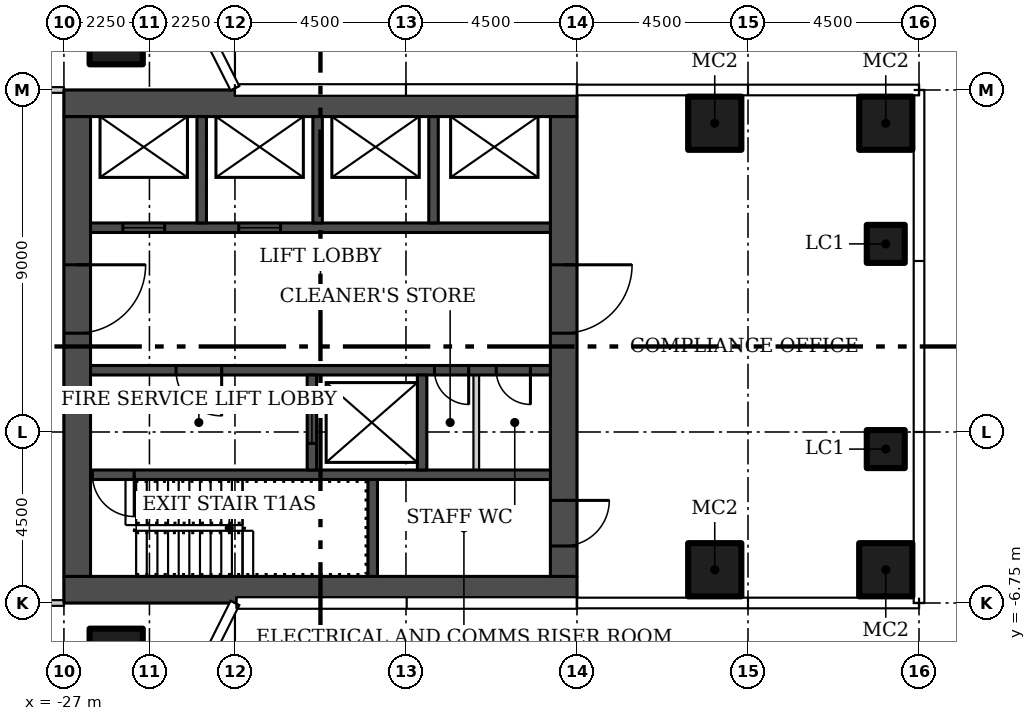
"""IFC4 building model, lengths in metres.
Left out: names, types, materials, properties, quantities, classifications, styles, units other than length and angle.
Written with IfcOpenShell. Run it as: python <this file> out.ifc"""

import sys

from ifc_helpers import new_model, si_unit, direction, frame, frame_2d, origin, origin_2d, place, context, subcontext, project, spatial, rectangle, hollow_rectangle, extrude, element, fill, save


model = new_model("IFC4")
c1 = context("Model", 3, precision=1e-05, world=origin(), true_north=direction((0.0, 1.0)))
c2 = subcontext(c1, "Body", "Model", "MODEL_VIEW")
j1 = project(units=[si_unit("LENGTHUNIT", "METRE"), si_unit("PLANEANGLEUNIT", "RADIAN")], contexts=[c1])
p1 = place(None, origin())
s1 = spatial("IfcSite", under=j1, at=p1, CompositionType="ELEMENT")
p2 = place(p1, origin())
s2 = spatial("IfcBuilding", under=s1, at=p2, CompositionType="ELEMENT")
p3 = place(p2, frame((0.0, 0.0, 65.4)))
s3 = spatial("IfcBuildingStorey", under=s2, at=p3, CompositionType="ELEMENT", Elevation=65.4)
for number, where in (
    (1, (-25.625, 8.125, 0.0)),
    (2, (-25.625, -8.125, 0.0)),
    (3, (-9.875, -5.875, 0.0)),
    (4, (-5.375, -5.875, 0.0)),
    (5, (-9.875, 5.875, 0.0)),
    (6, (-5.375, 5.875, 0.0)),
):
    element("IfcColumn", number, at=place(p3, frame(where)), inside=s3, PredefinedType="COLUMN", context=c2, shape_type="SweptSolid", body=[
        extrude(hollow_rectangle(XDim=1.4, YDim=1.4, WallThickness=0.05, at=origin_2d()), origin(), (0.0, 0.0, 1.0), 3.55),
    ])
for number, where in (
    (7, (-5.375, -2.7, 0.0)),
    (8, (-5.375, 2.7, 0.0)),
):
    element("IfcColumn", number, at=place(p3, frame(where)), inside=s3, PredefinedType="COLUMN", context=c2, shape_type="SweptSolid", body=[
        extrude(hollow_rectangle(XDim=1.0, YDim=1.0, WallThickness=0.04, at=origin_2d()), origin(), (0.0, 0.0, 1.0), 3.55),
    ])
p4 = place(p3, frame((-40.5, 6.75, 0.0)))
e9 = element("IfcWall", 9, at=p4, inside=s3, PredefinedType="PARTITIONING", context=c2, shape_type="SweptSolid", body=[
    extrude(rectangle(XDim=13.5, YDim=0.15, at=frame_2d((6.75, 0.0))), origin(), (0.0, 0.0, 1.0), 3.55),
])
p5 = place(p4, frame((6.0, 0.0, 0.0)))
e10 = element("IfcOpeningElement", 10, at=p5, cuts=e9, PredefinedType="OPENING", context=c2, shape_type="SweptSolid", body=[
    extrude(rectangle(XDim=1.5, YDim=2.1, at=frame_2d((0.75, 1.05))), frame((0.0, 0.085, 0.0), z_axis=(0.0, -1.0, 0.0), x_axis=(1.0, 0.0, 0.0)), (0.0, 0.0, 1.0), 0.17),
])
p6 = place(p3, frame((-27.0, -6.75, 0.0), z_axis=(0.0, 0.0, 1.0), x_axis=(-1.0, 0.0, 0.0)))
e11 = element("IfcWall", 11, at=p6, inside=s3, PredefinedType="PARTITIONING", context=c2, shape_type="SweptSolid", body=[
    extrude(rectangle(XDim=13.5, YDim=0.15, at=frame_2d((6.75, 0.0))), origin(), (0.0, 0.0, 1.0), 3.55),
])
p7 = place(p6, frame((3.75, 0.0, 0.0)))
e12 = element("IfcOpeningElement", 12, at=p7, cuts=e11, PredefinedType="OPENING", context=c2, shape_type="SweptSolid", body=[
    extrude(rectangle(XDim=1.5, YDim=2.1, at=frame_2d((0.75, 1.05))), frame((0.0, 0.085, 0.0), z_axis=(0.0, -1.0, 0.0), x_axis=(1.0, 0.0, 0.0)), (0.0, 0.0, 1.0), 0.17),
])
p8 = place(p6, frame((10.5, 0.0, 0.0)))
e13 = element("IfcOpeningElement", 13, at=p8, cuts=e11, PredefinedType="OPENING", context=c2, shape_type="SweptSolid", body=[
    extrude(rectangle(XDim=1.5, YDim=2.1, at=frame_2d((0.75, 1.05))), frame((0.0, 0.085, 0.0), z_axis=(0.0, -1.0, 0.0), x_axis=(1.0, 0.0, 0.0)), (0.0, 0.0, 1.0), 0.17),
])
for number, where in (
    (14, (-27.0, -6.4, 0.0)),
    (15, (-27.0, 6.4, 0.0)),
):
    element("IfcWall", number, at=place(p3, frame(where)), inside=s3, PredefinedType="SHEAR", context=c2, shape_type="SweptSolid", body=[
        extrude(rectangle(XDim=13.5, YDim=0.7, at=frame_2d((6.75, 0.0))), origin(), (0.0, 0.0, 1.0), 3.55),
    ])
p9 = place(p3, frame((-26.65, 6.05, 0.0), z_axis=(0.0, 0.0, 1.0), x_axis=(0.0, -1.0, 0.0)))
e16 = element("IfcWall", 16, at=p9, inside=s3, PredefinedType="SHEAR", context=c2, shape_type="SweptSolid", body=[
    extrude(rectangle(XDim=12.1, YDim=0.7, at=frame_2d((6.05, 0.0))), origin(), (0.0, 0.0, 1.0), 3.55),
])
p10 = place(p9, frame((3.9, 0.0, 0.0)))
e17 = element("IfcOpeningElement", 17, at=p10, cuts=e16, PredefinedType="OPENING", context=c2, shape_type="SweptSolid", body=[
    extrude(rectangle(XDim=1.8, YDim=2.4, at=frame_2d((0.9, 1.2))), frame((0.0, 0.36, 0.0), z_axis=(0.0, -1.0, 0.0), x_axis=(1.0, 0.0, 0.0)), (0.0, 0.0, 1.0), 0.72),
])
p11 = place(p3, frame((-13.85, 6.05, 0.0), z_axis=(0.0, 0.0, 1.0), x_axis=(0.0, -1.0, 0.0)))
e18 = element("IfcWall", 18, at=p11, inside=s3, PredefinedType="SHEAR", context=c2, shape_type="SweptSolid", body=[
    extrude(rectangle(XDim=12.1, YDim=0.7, at=frame_2d((6.05, 0.0))), origin(), (0.0, 0.0, 1.0), 3.55),
])
p12 = place(p11, frame((10.1, 0.0, 0.0)))
e19 = element("IfcOpeningElement", 19, at=p12, cuts=e18, PredefinedType="OPENING", context=c2, shape_type="SweptSolid", body=[
    extrude(rectangle(XDim=1.2, YDim=2.1, at=frame_2d((0.6, 1.05))), frame((0.0, 0.36, 0.0), z_axis=(0.0, -1.0, 0.0), x_axis=(1.0, 0.0, 0.0)), (0.0, 0.0, 1.0), 0.72),
])
p13 = place(p11, frame((3.9, 0.0, 0.0)))
e20 = element("IfcOpeningElement", 20, at=p13, cuts=e18, PredefinedType="OPENING", context=c2, shape_type="SweptSolid", body=[
    extrude(rectangle(XDim=1.8, YDim=2.4, at=frame_2d((0.9, 1.2))), frame((0.0, 0.36, 0.0), z_axis=(0.0, -1.0, 0.0), x_axis=(1.0, 0.0, 0.0)), (0.0, 0.0, 1.0), 0.72),
])
p14 = place(p3, frame((-14.2, -3.375, 0.0), z_axis=(0.0, 0.0, 1.0), x_axis=(-1.0, 0.0, 0.0)))
e21 = element("IfcWall", 21, at=p14, inside=s3, PredefinedType="SHEAR", context=c2, shape_type="SweptSolid", body=[
    extrude(rectangle(XDim=12.1, YDim=0.25, at=frame_2d((6.05, 0.0))), origin(), (0.0, 0.0, 1.0), 3.55),
])
p15 = place(p14, frame((10.95, 0.0, 0.0)))
e22 = element("IfcOpeningElement", 22, at=p15, cuts=e21, PredefinedType="OPENING", context=c2, shape_type="SweptSolid", body=[
    extrude(rectangle(XDim=1.1, YDim=2.1, at=frame_2d((0.55, 1.05))), frame((0.0, 0.135, 0.0), z_axis=(0.0, -1.0, 0.0), x_axis=(1.0, 0.0, 0.0)), (0.0, 0.0, 1.0), 0.27),
])
p16 = place(p3, frame((-18.875, -6.05, 0.0), z_axis=(0.0, 0.0, 1.0), x_axis=(0.0, 1.0, 0.0)))
e23 = element("IfcWall", 23, at=p16, inside=s3, PredefinedType="SHEAR", context=c2, shape_type="SweptSolid", body=[
    extrude(rectangle(XDim=2.55, YDim=0.25, at=frame_2d((1.275, 0.0))), origin(), (0.0, 0.0, 1.0), 3.55),
])
p17 = place(p3, frame((-14.2, -0.625, 0.0), z_axis=(0.0, 0.0, 1.0), x_axis=(-1.0, 0.0, 0.0)))
e24 = element("IfcWall", 24, at=p17, inside=s3, PredefinedType="SHEAR", context=c2, shape_type="SweptSolid", body=[
    extrude(rectangle(XDim=12.1, YDim=0.25, at=frame_2d((6.05, 0.0))), origin(), (0.0, 0.0, 1.0), 3.55),
])
p18 = place(p17, frame((8.65, 0.0, 0.0)))
e25 = element("IfcOpeningElement", 25, at=p18, cuts=e24, PredefinedType="OPENING", context=c2, shape_type="SweptSolid", body=[
    extrude(rectangle(XDim=1.2, YDim=2.1, at=frame_2d((0.6, 1.05))), frame((0.0, 0.135, 0.0), z_axis=(0.0, -1.0, 0.0), x_axis=(1.0, 0.0, 0.0)), (0.0, 0.0, 1.0), 0.27),
])
p19 = place(p17, frame((2.15, 0.0, 0.0)))
e26 = element("IfcOpeningElement", 26, at=p19, cuts=e24, PredefinedType="OPENING", context=c2, shape_type="SweptSolid", body=[
    extrude(rectangle(XDim=0.9, YDim=2.1, at=frame_2d((0.45, 1.05))), frame((0.0, 0.135, 0.0), z_axis=(0.0, -1.0, 0.0), x_axis=(1.0, 0.0, 0.0)), (0.0, 0.0, 1.0), 0.27),
])
p20 = place(p17, frame((0.525, 0.0, 0.0)))
e27 = element("IfcOpeningElement", 27, at=p20, cuts=e24, PredefinedType="OPENING", context=c2, shape_type="SweptSolid", body=[
    extrude(rectangle(XDim=0.9, YDim=2.1, at=frame_2d((0.45, 1.05))), frame((0.0, 0.135, 0.0), z_axis=(0.0, -1.0, 0.0), x_axis=(1.0, 0.0, 0.0)), (0.0, 0.0, 1.0), 0.27),
])
p21 = place(p3, frame((-20.475, -3.25, 0.0), z_axis=(0.0, 0.0, 1.0), x_axis=(0.0, 1.0, 0.0)))
e28 = element("IfcWall", 28, at=p21, inside=s3, PredefinedType="SHEAR", context=c2, shape_type="SweptSolid", body=[
    extrude(rectangle(XDim=2.5, YDim=0.25, at=frame_2d((1.25, 0.0))), origin(), (0.0, 0.0, 1.0), 3.55),
])
p22 = place(p21, frame((0.7, 0.0, 0.0)))
e29 = element("IfcOpeningElement", 29, at=p22, cuts=e28, PredefinedType="OPENING", context=c2, shape_type="SweptSolid", body=[
    extrude(rectangle(XDim=1.1, YDim=2.1, at=frame_2d((0.55, 1.05))), frame((0.0, 0.135, 0.0), z_axis=(0.0, -1.0, 0.0), x_axis=(1.0, 0.0, 0.0)), (0.0, 0.0, 1.0), 0.27),
])
p23 = place(p3, frame((-17.575, -3.25, 0.0), z_axis=(0.0, 0.0, 1.0), x_axis=(0.0, 1.0, 0.0)))
e30 = element("IfcWall", 30, at=p23, inside=s3, PredefinedType="SHEAR", context=c2, shape_type="SweptSolid", body=[
    extrude(rectangle(XDim=2.5, YDim=0.25, at=frame_2d((1.25, 0.0))), origin(), (0.0, 0.0, 1.0), 3.55),
])
p24 = place(p3, frame((-16.15, -3.25, 0.0), z_axis=(0.0, 0.0, 1.0), x_axis=(0.0, 1.0, 0.0)))
e31 = element("IfcWall", 31, at=p24, inside=s3, PredefinedType="PARTITIONING", context=c2, shape_type="SweptSolid", body=[
    extrude(rectangle(XDim=2.5, YDim=0.15, at=frame_2d((1.25, 0.0))), origin(), (0.0, 0.0, 1.0), 3.55),
])
p25 = place(p3, frame((-26.3, 3.125, 0.0)))
e32 = element("IfcWall", 32, at=p25, inside=s3, PredefinedType="SHEAR", context=c2, shape_type="SweptSolid", body=[
    extrude(rectangle(XDim=12.1, YDim=0.25, at=frame_2d((6.05, 0.0))), origin(), (0.0, 0.0, 1.0), 3.55),
])
p26 = place(p25, frame((0.85, 0.0, 0.0)))
e33 = element("IfcOpeningElement", 33, at=p26, cuts=e32, PredefinedType="OPENING", context=c2, shape_type="SweptSolid", body=[
    extrude(rectangle(XDim=1.1, YDim=2.1, at=frame_2d((0.55, 1.05))), frame((0.0, 0.135, 0.0), z_axis=(0.0, -1.0, 0.0), x_axis=(1.0, 0.0, 0.0)), (0.0, 0.0, 1.0), 0.27),
])
p27 = place(p25, frame((3.9, 0.0, 0.0)))
e34 = element("IfcOpeningElement", 34, at=p27, cuts=e32, PredefinedType="OPENING", context=c2, shape_type="SweptSolid", body=[
    extrude(rectangle(XDim=1.1, YDim=2.1, at=frame_2d((0.55, 1.05))), frame((0.0, 0.135, 0.0), z_axis=(0.0, -1.0, 0.0), x_axis=(1.0, 0.0, 0.0)), (0.0, 0.0, 1.0), 0.27),
])
for number, where, z_axis, x_axis in (
    (35, (-23.375, 3.25, 0.0), (0.0, 0.0, 1.0), (0.0, 1.0, 0.0)),
    (36, (-20.325, 3.25, 0.0), (0.0, 0.0, 1.0), (0.0, 1.0, 0.0)),
    (37, (-17.275, 3.25, 0.0), (0.0, 0.0, 1.0), (0.0, 1.0, 0.0)),
):
    element("IfcWall", number, at=place(p3, frame(where, z_axis=z_axis, x_axis=x_axis)), inside=s3, PredefinedType="SHEAR", context=c2, shape_type="SweptSolid", body=[
        extrude(rectangle(XDim=2.8, YDim=0.25, at=frame_2d((1.4, 0.0))), origin(), (0.0, 0.0, 1.0), 3.55),
    ])
p28 = place(p10, origin())
e38 = element("IfcDoor", 38, at=p28, inside=s3, OperationType="DOUBLE_DOOR_SINGLE_SWING", PredefinedType="DOOR", context=c2, shape_type="SweptSolid", body=[
    extrude(rectangle(XDim=1.8, YDim=2.4, at=frame_2d((0.9, 1.2))), frame((0.0, 0.025, 0.0), z_axis=(0.0, -1.0, 0.0), x_axis=(1.0, 0.0, 0.0)), (0.0, 0.0, 1.0), 0.05),
])
fill(e17, e38)
p29 = place(p12, origin())
e39 = element("IfcDoor", 39, at=p29, inside=s3, OperationType="SINGLE_SWING_RIGHT", PredefinedType="DOOR", context=c2, shape_type="SweptSolid", body=[
    extrude(rectangle(XDim=1.2, YDim=2.1, at=frame_2d((0.6, 1.05))), frame((0.0, 0.025, 0.0), z_axis=(0.0, -1.0, 0.0), x_axis=(1.0, 0.0, 0.0)), (0.0, 0.0, 1.0), 0.05),
])
fill(e19, e39)
p30 = place(p13, origin())
e40 = element("IfcDoor", 40, at=p30, inside=s3, OperationType="DOUBLE_DOOR_SINGLE_SWING", PredefinedType="DOOR", context=c2, shape_type="SweptSolid", body=[
    extrude(rectangle(XDim=1.8, YDim=2.4, at=frame_2d((0.9, 1.2))), frame((0.0, 0.025, 0.0), z_axis=(0.0, -1.0, 0.0), x_axis=(1.0, 0.0, 0.0)), (0.0, 0.0, 1.0), 0.05),
])
fill(e20, e40)
p31 = place(p15, origin())
e41 = element("IfcDoor", 41, at=p31, inside=s3, OperationType="SINGLE_SWING_RIGHT", PredefinedType="DOOR", context=c2, shape_type="SweptSolid", body=[
    extrude(rectangle(XDim=1.1, YDim=2.1, at=frame_2d((0.55, 1.05))), frame((0.0, 0.025, 0.0), z_axis=(0.0, -1.0, 0.0), x_axis=(1.0, 0.0, 0.0)), (0.0, 0.0, 1.0), 0.05),
])
fill(e22, e41)
p32 = place(p18, origin())
e42 = element("IfcDoor", 42, at=p32, inside=s3, OperationType="SINGLE_SWING_RIGHT", PredefinedType="DOOR", context=c2, shape_type="SweptSolid", body=[
    extrude(rectangle(XDim=1.2, YDim=2.1, at=frame_2d((0.6, 1.05))), frame((0.0, 0.025, 0.0), z_axis=(0.0, -1.0, 0.0), x_axis=(1.0, 0.0, 0.0)), (0.0, 0.0, 1.0), 0.05),
])
fill(e25, e42)
p33 = place(p19, origin())
e43 = element("IfcDoor", 43, at=p33, inside=s3, OperationType="SINGLE_SWING_LEFT", PredefinedType="DOOR", context=c2, shape_type="SweptSolid", body=[
    extrude(rectangle(XDim=0.9, YDim=2.1, at=frame_2d((0.45, 1.05))), frame((0.0, 0.025, 0.0), z_axis=(0.0, -1.0, 0.0), x_axis=(1.0, 0.0, 0.0)), (0.0, 0.0, 1.0), 0.05),
])
fill(e26, e43)
p34 = place(p20, origin())
e44 = element("IfcDoor", 44, at=p34, inside=s3, OperationType="SINGLE_SWING_LEFT", PredefinedType="DOOR", context=c2, shape_type="SweptSolid", body=[
    extrude(rectangle(XDim=0.9, YDim=2.1, at=frame_2d((0.45, 1.05))), frame((0.0, 0.025, 0.0), z_axis=(0.0, -1.0, 0.0), x_axis=(1.0, 0.0, 0.0)), (0.0, 0.0, 1.0), 0.05),
])
fill(e27, e44)
p35 = place(p22, origin())
e45 = element("IfcDoor", 45, at=p35, inside=s3, OperationType="SLIDING_TO_LEFT", PredefinedType="DOOR", context=c2, shape_type="SweptSolid", body=[
    extrude(rectangle(XDim=1.1, YDim=2.1, at=frame_2d((0.55, 1.05))), frame((0.0, 0.025, 0.0), z_axis=(0.0, -1.0, 0.0), x_axis=(1.0, 0.0, 0.0)), (0.0, 0.0, 1.0), 0.05),
])
fill(e29, e45)
p36 = place(p26, origin())
e46 = element("IfcDoor", 46, at=p36, inside=s3, OperationType="SLIDING_TO_LEFT", PredefinedType="DOOR", context=c2, shape_type="SweptSolid", body=[
    extrude(rectangle(XDim=1.1, YDim=2.1, at=frame_2d((0.55, 1.05))), frame((0.0, 0.025, 0.0), z_axis=(0.0, -1.0, 0.0), x_axis=(1.0, 0.0, 0.0)), (0.0, 0.0, 1.0), 0.05),
])
fill(e33, e46)
p37 = place(p27, origin())
e47 = element("IfcDoor", 47, at=p37, inside=s3, OperationType="SLIDING_TO_LEFT", PredefinedType="DOOR", context=c2, shape_type="SweptSolid", body=[
    extrude(rectangle(XDim=1.1, YDim=2.1, at=frame_2d((0.55, 1.05))), frame((0.0, 0.025, 0.0), z_axis=(0.0, -1.0, 0.0), x_axis=(1.0, 0.0, 0.0)), (0.0, 0.0, 1.0), 0.05),
])
fill(e34, e47)
save(model, sys.argv[1])
